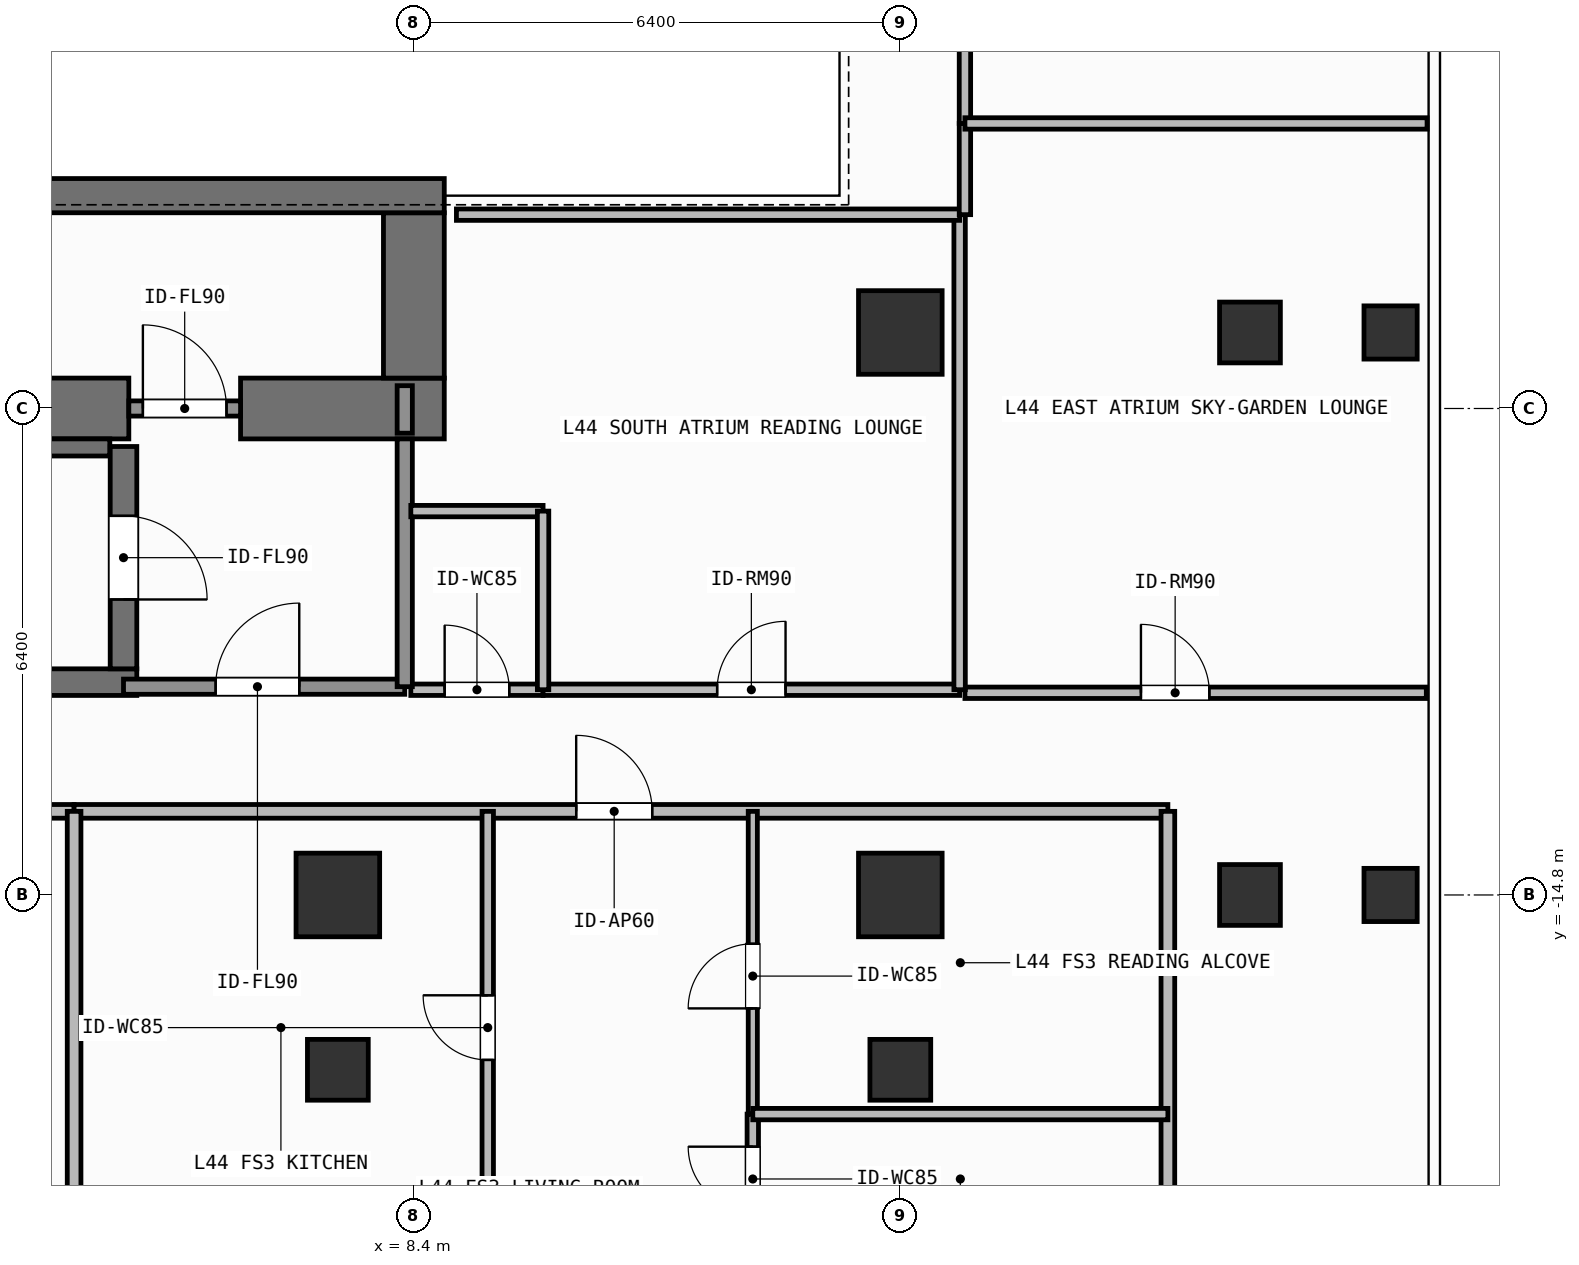
"""IFC4 building model, lengths in metres.
Left out: names, types, materials, properties, quantities, classifications, styles, units other than length and angle.
Written with IfcOpenShell. Run it as: python <this file> out.ifc"""

import sys

from ifc_helpers import new_model, si_unit, direction, frame, frame_2d, origin, origin_2d, place, context, subcontext, project, spatial, rectangle, hollow_rectangle, extrude, element, fill, save


model = new_model("IFC4")
c1 = context("Model", 3, precision=1e-05, world=origin(), true_north=direction((0.0, 1.0)))
c2 = subcontext(c1, "Body", "Model", "MODEL_VIEW")
j1 = project(units=[si_unit("LENGTHUNIT", "METRE"), si_unit("PLANEANGLEUNIT", "RADIAN")], contexts=[c1])
p1 = place(None, origin())
s1 = spatial("IfcSite", under=j1, at=p1, CompositionType="ELEMENT")
p2 = place(p1, origin())
s2 = spatial("IfcBuilding", under=s1, at=p2, CompositionType="ELEMENT")
p3 = place(p2, frame((0.0, 0.0, 179.7)))
s3 = spatial("IfcBuildingStorey", under=s2, at=p3, CompositionType="ELEMENT", Elevation=179.7)
p4 = place(p3, frame((-2.62, -8.4, 0.0), z_axis=(0.0, 0.0, 1.0), x_axis=(1.0, 0.0, 0.0)))
e1 = element("IfcWall", 1, at=p4, inside=s3, PredefinedType="SHEAR", context=c2, shape_type="SweptSolid", body=[
    extrude(rectangle(XDim=7.27, YDim=0.8, at=frame_2d((3.635, 0.0))), origin(), (0.0, 0.0, 1.0), 3.9),
])
p5 = place(p3, frame((6.12, -8.4, 0.0), z_axis=(0.0, 0.0, 1.0), x_axis=(1.0, 0.0, 0.0)))
e2 = element("IfcWall", 2, at=p5, inside=s3, PredefinedType="SHEAR", context=c2, shape_type="SweptSolid", body=[
    extrude(rectangle(XDim=2.68, YDim=0.8, at=frame_2d((1.34, 0.0))), origin(), (0.0, 0.0, 1.0), 3.9),
])
p6 = place(p3, frame((8.4, -8.0, 0.0), z_axis=(0.0, 0.0, 1.0), x_axis=(0.0, 1.0, 0.0)))
e3 = element("IfcWall", 3, at=p6, inside=s3, PredefinedType="SHEAR", context=c2, shape_type="SweptSolid", body=[
    extrude(rectangle(XDim=2.175, YDim=0.8, at=frame_2d((1.087, 0.0))), origin(), (0.0, 0.0, 1.0), 3.9),
])
p7 = place(p3, frame((3.045, -5.6, 0.0), z_axis=(0.0, 0.0, 1.0), x_axis=(1.0, 0.0, 0.0)))
e4 = element("IfcWall", 4, at=p7, inside=s3, PredefinedType="SHEAR", context=c2, shape_type="SweptSolid", body=[
    extrude(rectangle(XDim=5.755, YDim=0.45, at=frame_2d((2.877, 0.0))), origin(), (0.0, 0.0, 1.0), 3.9),
])
p8 = place(p3, frame((-2.555, -12.0, 0.0), z_axis=(0.0, 0.0, 1.0), x_axis=(1.0, 0.0, 0.0)))
e5 = element("IfcWall", 5, at=p8, inside=s3, PredefinedType="SHEAR", context=c2, shape_type="SweptSolid", body=[
    extrude(rectangle(XDim=7.31, YDim=0.35, at=frame_2d((3.655, 0.0))), origin(), (0.0, 0.0, 1.0), 3.9),
])
p9 = place(p3, frame((-2.2, -8.913, 0.0), z_axis=(0.0, 0.0, 1.0), x_axis=(1.0, 0.0, 0.0)))
e6 = element("IfcWall", 6, at=p9, inside=s3, PredefinedType="SHEAR", context=c2, shape_type="SweptSolid", body=[
    extrude(rectangle(XDim=6.6, YDim=0.225, at=frame_2d((3.3, 0.0))), origin(), (0.0, 0.0, 1.0), 3.9),
])
p10 = place(p3, frame((4.58, -8.9, 0.0), z_axis=(0.0, 0.0, 1.0), x_axis=(0.0, -1.0, 0.0)))
e7 = element("IfcWall", 7, at=p10, inside=s3, PredefinedType="SHEAR", context=c2, shape_type="SweptSolid", body=[
    extrude(rectangle(XDim=2.925, YDim=0.35, at=frame_2d((1.462, 0.0))), origin(), (0.0, 0.0, 1.0), 3.9),
])
p11 = place(p10, frame((0.913, 0.0, 0.0)))
e8 = element("IfcOpeningElement", 8, at=p11, cuts=e7, PredefinedType="OPENING", context=c2, shape_type="SweptSolid", body=[
    extrude(rectangle(XDim=1.1, YDim=2.15, at=frame_2d((0.55, 1.075))), frame((0.0, 0.185, 0.0), z_axis=(0.0, -1.0, 0.0), x_axis=(1.0, 0.0, 0.0)), (0.0, 0.0, 1.0), 0.37),
])
for number, where, z_axis, x_axis in (
    (9, (7.4, -14.8, 0.0), (0.0, 0.0, 1.0), (1.0, 0.0, 0.0)),
    (10, (14.8, -14.8, 0.0), (0.0, 0.0, 1.0), (1.0, 0.0, 0.0)),
    (11, (14.8, -7.4, 0.0), (0.0, 0.0, 1.0), (1.0, 0.0, 0.0)),
):
    element("IfcColumn", number, at=place(p3, frame(where, z_axis=z_axis, x_axis=x_axis)), inside=s3, PredefinedType="COLUMN", context=c2, shape_type="SweptSolid", body=[
        extrude(rectangle(XDim=1.1, YDim=1.1, at=origin_2d()), origin(), (0.0, 0.0, 1.0), 3.9),
    ])
for number, where, z_axis, x_axis in (
    (12, (19.4, -14.8, 0.0), (0.0, 0.0, 1.0), (1.0, 0.0, 0.0)),
    (13, (19.4, -7.4, 0.0), (0.0, 0.0, 1.0), (1.0, 0.0, 0.0)),
    (14, (7.4, -17.1, 0.0), (0.0, 0.0, 1.0), (1.0, 0.0, 0.0)),
    (15, (14.8, -17.1, 0.0), (0.0, 0.0, 1.0), (1.0, 0.0, 0.0)),
):
    element("IfcColumn", number, at=place(p3, frame(where, z_axis=z_axis, x_axis=x_axis)), inside=s3, PredefinedType="COLUMN", context=c2, shape_type="SweptSolid", body=[
        extrude(hollow_rectangle(XDim=0.8, YDim=0.8, WallThickness=0.036, at=origin_2d()), origin(), (0.0, 0.0, 1.0), 3.9),
    ])
for number, where, z_axis, x_axis in (
    (16, (21.25, -14.8, 0.0), (0.0, 0.0, 1.0), (1.0, 0.0, 0.0)),
    (17, (21.25, -7.4, 0.0), (0.0, 0.0, 1.0), (1.0, 0.0, 0.0)),
):
    element("IfcColumn", number, at=place(p3, frame(where, z_axis=z_axis, x_axis=x_axis)), inside=s3, PredefinedType="COLUMN", context=c2, shape_type="SweptSolid", body=[
        extrude(hollow_rectangle(XDim=0.7, YDim=0.7, WallThickness=0.032, at=origin_2d()), origin(), (0.0, 0.0, 1.0), 3.9),
    ])
p12 = place(p3, frame((4.58, -12.06, 0.0), z_axis=(0.0, 0.0, 1.0), x_axis=(1.0, 0.0, 0.0)))
e18 = element("IfcWall", 18, at=p12, inside=s3, PredefinedType="SOLIDWALL", context=c2, shape_type="SweptSolid", body=[
    extrude(rectangle(XDim=3.7, YDim=0.2, at=frame_2d((1.85, 0.0))), origin(), (0.0, 0.0, 1.0), 3.68),
])
p13 = place(p12, frame((1.212, 0.0, 0.0)))
e19 = element("IfcOpeningElement", 19, at=p13, cuts=e18, PredefinedType="OPENING", context=c2, shape_type="SweptSolid", body=[
    extrude(rectangle(XDim=1.1, YDim=2.15, at=frame_2d((0.55, 1.075))), frame((0.0, 0.11, 0.0), z_axis=(0.0, -1.0, 0.0), x_axis=(1.0, 0.0, 0.0)), (0.0, 0.0, 1.0), 0.22),
])
p14 = place(p3, frame((4.65, -8.4, 0.0), z_axis=(0.0, 0.0, 1.0), x_axis=(1.0, 0.0, 0.0)))
e20 = element("IfcWall", 20, at=p14, inside=s3, PredefinedType="SOLIDWALL", context=c2, shape_type="SweptSolid", body=[
    extrude(rectangle(XDim=1.47, YDim=0.2, at=frame_2d((0.735, 0.0))), origin(), (0.0, 0.0, 1.0), 2.82),
])
p15 = place(p14, frame((0.185, 0.0, 0.0)))
e21 = element("IfcOpeningElement", 21, at=p15, cuts=e20, PredefinedType="OPENING", context=c2, shape_type="SweptSolid", body=[
    extrude(rectangle(XDim=1.1, YDim=2.15, at=frame_2d((0.55, 1.075))), frame((0.0, 0.11, 0.0), z_axis=(0.0, -1.0, 0.0), x_axis=(1.0, 0.0, 0.0)), (0.0, 0.0, 1.0), 0.22),
])
p16 = place(p3, frame((8.36, -12.1, 0.0), z_axis=(0.0, 0.0, 1.0), x_axis=(1.0, 0.0, 0.0)))
e22 = element("IfcWall", 22, at=p16, inside=s3, PredefinedType="PARTITIONING", context=c2, shape_type="SweptSolid", body=[
    extrude(rectangle(XDim=1.74, YDim=0.15, at=frame_2d((0.87, 0.0))), origin(), (0.0, 0.0, 1.0), 3.68),
])
p17 = place(p16, frame((0.445, 0.0, 0.0)))
e23 = element("IfcOpeningElement", 23, at=p17, cuts=e22, PredefinedType="OPENING", context=c2, shape_type="SweptSolid", body=[
    extrude(rectangle(XDim=0.85, YDim=2.1, at=frame_2d((0.425, 1.05))), frame((0.0, 0.085, 0.0), z_axis=(0.0, -1.0, 0.0), x_axis=(1.0, 0.0, 0.0)), (0.0, 0.0, 1.0), 0.17),
])
p18 = place(p3, frame((10.1, -12.1, 0.0), z_axis=(0.0, 0.0, 1.0), x_axis=(1.0, 0.0, 0.0)))
e24 = element("IfcWall", 24, at=p18, inside=s3, PredefinedType="PARTITIONING", context=c2, shape_type="SweptSolid", body=[
    extrude(rectangle(XDim=5.48, YDim=0.15, at=frame_2d((2.74, 0.0))), origin(), (0.0, 0.0, 1.0), 3.68),
])
p19 = place(p18, frame((2.29, 0.0, 0.0)))
e25 = element("IfcOpeningElement", 25, at=p19, cuts=e24, PredefinedType="OPENING", context=c2, shape_type="SweptSolid", body=[
    extrude(rectangle(XDim=0.9, YDim=2.1, at=frame_2d((0.45, 1.05))), frame((0.0, 0.085, 0.0), z_axis=(0.0, -1.0, 0.0), x_axis=(1.0, 0.0, 0.0)), (0.0, 0.0, 1.0), 0.17),
])
p20 = place(p3, frame((-6.618, -13.7, 0.0), z_axis=(0.0, 0.0, 1.0), x_axis=(1.0, 0.0, 0.0)))
e26 = element("IfcWall", 26, at=p20, inside=s3, PredefinedType="PARTITIONING", context=c2, shape_type="SweptSolid", body=[
    extrude(rectangle(XDim=10.548, YDim=0.18, at=frame_2d((5.274, 0.0))), origin(), (0.0, 0.0, 1.0), 3.68),
])
p21 = place(p20, frame((4.951, 0.0, 0.0)))
e27 = element("IfcOpeningElement", 27, at=p21, cuts=e26, PredefinedType="OPENING", context=c2, shape_type="SweptSolid", body=[
    extrude(rectangle(XDim=1.0, YDim=2.2, at=frame_2d((0.5, 1.1))), frame((0.0, 0.1, 0.0), z_axis=(0.0, -1.0, 0.0), x_axis=(1.0, 0.0, 0.0)), (0.0, 0.0, 1.0), 0.2),
])
p22 = place(p3, frame((3.93, -13.7, 0.0), z_axis=(0.0, 0.0, 1.0), x_axis=(1.0, 0.0, 0.0)))
e28 = element("IfcWall", 28, at=p22, inside=s3, PredefinedType="PARTITIONING", context=c2, shape_type="SweptSolid", body=[
    extrude(rectangle(XDim=14.39, YDim=0.18, at=frame_2d((7.195, 0.0))), origin(), (0.0, 0.0, 1.0), 3.68),
])
p23 = place(p22, frame((6.605, 0.0, 0.0)))
e29 = element("IfcOpeningElement", 29, at=p23, cuts=e28, PredefinedType="OPENING", context=c2, shape_type="SweptSolid", body=[
    extrude(rectangle(XDim=1.0, YDim=2.2, at=frame_2d((0.5, 1.1))), frame((0.0, 0.1, 0.0), z_axis=(0.0, -1.0, 0.0), x_axis=(1.0, 0.0, 0.0)), (0.0, 0.0, 1.0), 0.2),
])
p24 = place(p3, frame((9.372, -19.39, 0.0), z_axis=(0.0, 0.0, 1.0), x_axis=(0.0, 1.0, 0.0)))
e30 = element("IfcWall", 30, at=p24, inside=s3, PredefinedType="PARTITIONING", context=c2, shape_type="SweptSolid", body=[
    extrude(rectangle(XDim=5.69, YDim=0.15, at=frame_2d((2.845, 0.0))), origin(), (0.0, 0.0, 1.0), 3.68),
])
p25 = place(p24, frame((2.42, 0.0, 0.0)))
e31 = element("IfcOpeningElement", 31, at=p25, cuts=e30, PredefinedType="OPENING", context=c2, shape_type="SweptSolid", body=[
    extrude(rectangle(XDim=0.85, YDim=2.1, at=frame_2d((0.425, 1.05))), frame((0.0, 0.085, 0.0), z_axis=(0.0, -1.0, 0.0), x_axis=(1.0, 0.0, 0.0)), (0.0, 0.0, 1.0), 0.17),
])
p26 = place(p3, frame((12.859, -19.39, 0.0), z_axis=(0.0, 0.0, 1.0), x_axis=(0.0, 1.0, 0.0)))
e32 = element("IfcWall", 32, at=p26, inside=s3, PredefinedType="PARTITIONING", context=c2, shape_type="SweptSolid", body=[
    extrude(rectangle(XDim=1.707, YDim=0.15, at=frame_2d((0.854, 0.0))), origin(), (0.0, 0.0, 1.0), 3.68),
])
p27 = place(p26, frame((0.428, 0.0, 0.0)))
e33 = element("IfcOpeningElement", 33, at=p27, cuts=e32, PredefinedType="OPENING", context=c2, shape_type="SweptSolid", body=[
    extrude(rectangle(XDim=0.85, YDim=2.1, at=frame_2d((0.425, 1.05))), frame((0.0, 0.085, 0.0), z_axis=(0.0, -1.0, 0.0), x_axis=(1.0, 0.0, 0.0)), (0.0, 0.0, 1.0), 0.17),
])
p28 = place(p3, frame((12.859, -17.683, 0.0), z_axis=(0.0, 0.0, 1.0), x_axis=(0.0, 1.0, 0.0)))
e34 = element("IfcWall", 34, at=p28, inside=s3, PredefinedType="PARTITIONING", context=c2, shape_type="SweptSolid", body=[
    extrude(rectangle(XDim=3.983, YDim=0.12, at=frame_2d((1.992, 0.0))), origin(), (0.0, 0.0, 1.0), 3.68),
])
p29 = place(p28, frame((1.391, 0.0, 0.0)))
e35 = element("IfcOpeningElement", 35, at=p29, cuts=e34, PredefinedType="OPENING", context=c2, shape_type="SweptSolid", body=[
    extrude(rectangle(XDim=0.85, YDim=2.1, at=frame_2d((0.425, 1.05))), frame((0.0, 0.07, 0.0), z_axis=(0.0, -1.0, 0.0), x_axis=(1.0, 0.0, 0.0)), (0.0, 0.0, 1.0), 0.14),
])
p30 = place(p3, frame((15.65, -12.14, 0.0), z_axis=(0.0, 0.0, 1.0), x_axis=(1.0, 0.0, 0.0)))
e36 = element("IfcWall", 36, at=p30, inside=s3, PredefinedType="PARTITIONING", context=c2, shape_type="SweptSolid", body=[
    extrude(rectangle(XDim=6.07, YDim=0.15, at=frame_2d((3.035, 0.0))), origin(), (0.0, 0.0, 1.0), 3.68),
])
p31 = place(p30, frame((2.316, 0.0, 0.0)))
e37 = element("IfcOpeningElement", 37, at=p31, cuts=e36, PredefinedType="OPENING", context=c2, shape_type="SweptSolid", body=[
    extrude(rectangle(XDim=0.9, YDim=2.1, at=frame_2d((0.45, 1.05))), frame((0.0, 0.085, 0.0), z_axis=(0.0, -1.0, 0.0), x_axis=(1.0, 0.0, 0.0)), (0.0, 0.0, 1.0), 0.17),
])
p32 = place(p3, frame((8.28, -12.06, 0.0), z_axis=(0.0, 0.0, 1.0), x_axis=(0.0, 1.0, 0.0)))
e38 = element("IfcWall", 38, at=p32, inside=s3, PredefinedType="SOLIDWALL", context=c2, shape_type="SweptSolid", body=[
    extrude(rectangle(XDim=3.26, YDim=0.2, at=frame_2d((1.63, 0.0))), origin(), (0.0, 0.0, 1.0), 3.68),
])
p33 = place(p3, frame((8.28, -8.725, 0.0), z_axis=(0.0, 0.0, 1.0), x_axis=(0.0, 1.0, 0.0)))
e39 = element("IfcWall", 39, at=p33, inside=s3, PredefinedType="SOLIDWALL", context=c2, shape_type="SweptSolid", body=[
    extrude(rectangle(XDim=0.625, YDim=0.2, at=frame_2d((0.312, 0.0))), origin(), (0.0, 0.0, 1.0), 3.68),
])
p34 = place(p3, frame((8.36, -9.75, 0.0), z_axis=(0.0, 0.0, 1.0), x_axis=(1.0, 0.0, 0.0)))
e40 = element("IfcWall", 40, at=p34, inside=s3, PredefinedType="PARTITIONING", context=c2, shape_type="SweptSolid", body=[
    extrude(rectangle(XDim=1.74, YDim=0.15, at=frame_2d((0.87, 0.0))), origin(), (0.0, 0.0, 1.0), 3.68),
])
p35 = place(p3, frame((10.1, -12.1, 0.0), z_axis=(0.0, 0.0, 1.0), x_axis=(0.0, 1.0, 0.0)))
e41 = element("IfcWall", 41, at=p35, inside=s3, PredefinedType="PARTITIONING", context=c2, shape_type="SweptSolid", body=[
    extrude(rectangle(XDim=2.35, YDim=0.15, at=frame_2d((1.175, 0.0))), origin(), (0.0, 0.0, 1.0), 3.68),
])
p36 = place(p3, frame((15.58, -12.1, 0.0), z_axis=(0.0, 0.0, 1.0), x_axis=(0.0, 1.0, 0.0)))
e42 = element("IfcWall", 42, at=p36, inside=s3, PredefinedType="PARTITIONING", context=c2, shape_type="SweptSolid", body=[
    extrude(rectangle(XDim=6.25, YDim=0.15, at=frame_2d((3.125, 0.0))), origin(), (0.0, 0.0, 1.0), 3.68),
])
p37 = place(p3, frame((8.96, -5.85, 0.0), z_axis=(0.0, 0.0, 1.0), x_axis=(1.0, 0.0, 0.0)))
e43 = element("IfcWall", 43, at=p37, inside=s3, PredefinedType="PARTITIONING", context=c2, shape_type="SweptSolid", body=[
    extrude(rectangle(XDim=6.62, YDim=0.15, at=frame_2d((3.31, 0.0))), origin(), (0.0, 0.0, 1.0), 3.68),
])
p38 = place(p3, frame((18.32, -22.51, 0.0), z_axis=(0.0, 0.0, 1.0), x_axis=(0.0, 1.0, 0.0)))
e44 = element("IfcWall", 44, at=p38, inside=s3, PredefinedType="PARTITIONING", context=c2, shape_type="SweptSolid", body=[
    extrude(rectangle(XDim=8.81, YDim=0.18, at=frame_2d((4.405, 0.0))), origin(), (0.0, 0.0, 1.0), 3.68),
])
p39 = place(p3, frame((12.859, -17.683, 0.0), z_axis=(0.0, 0.0, 1.0), x_axis=(1.0, 0.0, 0.0)))
e45 = element("IfcWall", 45, at=p39, inside=s3, PredefinedType="PARTITIONING", context=c2, shape_type="SweptSolid", body=[
    extrude(rectangle(XDim=5.461, YDim=0.15, at=frame_2d((2.73, 0.0))), origin(), (0.0, 0.0, 1.0), 3.68),
])
p40 = place(p3, frame((3.93, -23.63, 0.0), z_axis=(0.0, 0.0, 1.0), x_axis=(0.0, 1.0, 0.0)))
e46 = element("IfcWall", 46, at=p40, inside=s3, PredefinedType="PARTITIONING", context=c2, shape_type="SweptSolid", body=[
    extrude(rectangle(XDim=9.93, YDim=0.18, at=frame_2d((4.965, 0.0))), origin(), (0.0, 0.0, 1.0), 3.68),
])
p41 = place(p3, frame((15.65, -5.85, 0.0), z_axis=(0.0, 0.0, 1.0), x_axis=(0.0, 1.0, 0.0)))
e47 = element("IfcWall", 47, at=p41, inside=s3, PredefinedType="PARTITIONING", context=c2, shape_type="SweptSolid", body=[
    extrude(rectangle(XDim=1.2, YDim=0.15, at=frame_2d((0.6, 0.0))), origin(), (0.0, 0.0, 1.0), 3.68),
])
p42 = place(p3, frame((15.65, -4.65, 0.0), z_axis=(0.0, 0.0, 1.0), x_axis=(0.0, 1.0, 0.0)))
e48 = element("IfcWall", 48, at=p42, inside=s3, PredefinedType="PARTITIONING", context=c2, shape_type="SweptSolid", body=[
    extrude(rectangle(XDim=10.5, YDim=0.15, at=frame_2d((5.25, 0.0))), origin(), (0.0, 0.0, 1.0), 3.68),
])
p43 = place(p3, frame((15.65, -4.65, 0.0), z_axis=(0.0, 0.0, 1.0), x_axis=(1.0, 0.0, 0.0)))
e49 = element("IfcWall", 49, at=p43, inside=s3, PredefinedType="PARTITIONING", context=c2, shape_type="SweptSolid", body=[
    extrude(rectangle(XDim=6.08, YDim=0.15, at=frame_2d((3.04, 0.0))), origin(), (0.0, 0.0, 1.0), 3.68),
])
p44 = place(p11, origin())
e50 = element("IfcDoor", 50, at=p44, inside=s3, OperationType="SINGLE_SWING_RIGHT", PredefinedType="DOOR", context=c2, shape_type="SweptSolid", body=[
    extrude(rectangle(XDim=1.1, YDim=2.15, at=frame_2d((0.55, 1.075))), frame((0.0, 0.025, 0.0), z_axis=(0.0, -1.0, 0.0), x_axis=(1.0, 0.0, 0.0)), (0.0, 0.0, 1.0), 0.05),
])
fill(e8, e50)
p45 = place(p13, origin())
e51 = element("IfcDoor", 51, at=p45, inside=s3, OperationType="SINGLE_SWING_RIGHT", PredefinedType="DOOR", context=c2, shape_type="SweptSolid", body=[
    extrude(rectangle(XDim=1.1, YDim=2.15, at=frame_2d((0.55, 1.075))), frame((0.0, 0.025, 0.0), z_axis=(0.0, -1.0, 0.0), x_axis=(1.0, 0.0, 0.0)), (0.0, 0.0, 1.0), 0.05),
])
fill(e19, e51)
p46 = place(p15, origin())
e52 = element("IfcDoor", 52, at=p46, inside=s3, OperationType="SINGLE_SWING_LEFT", PredefinedType="DOOR", context=c2, shape_type="SweptSolid", body=[
    extrude(rectangle(XDim=1.1, YDim=2.15, at=frame_2d((0.55, 1.075))), frame((0.0, 0.025, 0.0), z_axis=(0.0, -1.0, 0.0), x_axis=(1.0, 0.0, 0.0)), (0.0, 0.0, 1.0), 0.05),
])
fill(e21, e52)
p47 = place(p17, origin())
e53 = element("IfcDoor", 53, at=p47, inside=s3, OperationType="SINGLE_SWING_LEFT", PredefinedType="DOOR", context=c2, shape_type="SweptSolid", body=[
    extrude(rectangle(XDim=0.85, YDim=2.1, at=frame_2d((0.425, 1.05))), frame((0.0, 0.025, 0.0), z_axis=(0.0, -1.0, 0.0), x_axis=(1.0, 0.0, 0.0)), (0.0, 0.0, 1.0), 0.05),
])
fill(e23, e53)
p48 = place(p19, origin())
e54 = element("IfcDoor", 54, at=p48, inside=s3, OperationType="SINGLE_SWING_RIGHT", PredefinedType="DOOR", context=c2, shape_type="SweptSolid", body=[
    extrude(rectangle(XDim=0.9, YDim=2.1, at=frame_2d((0.45, 1.05))), frame((0.0, 0.025, 0.0), z_axis=(0.0, -1.0, 0.0), x_axis=(1.0, 0.0, 0.0)), (0.0, 0.0, 1.0), 0.05),
])
fill(e25, e54)
p49 = place(p23, origin())
e55 = element("IfcDoor", 55, at=p49, inside=s3, OperationType="SINGLE_SWING_LEFT", PredefinedType="DOOR", context=c2, shape_type="SweptSolid", body=[
    extrude(rectangle(XDim=1.0, YDim=2.2, at=frame_2d((0.5, 1.1))), frame((0.0, 0.025, 0.0), z_axis=(0.0, -1.0, 0.0), x_axis=(1.0, 0.0, 0.0)), (0.0, 0.0, 1.0), 0.05),
])
fill(e29, e55)
p50 = place(p25, origin())
e56 = element("IfcDoor", 56, at=p50, inside=s3, OperationType="SINGLE_SWING_RIGHT", PredefinedType="DOOR", context=c2, shape_type="SweptSolid", body=[
    extrude(rectangle(XDim=0.85, YDim=2.1, at=frame_2d((0.425, 1.05))), frame((0.0, 0.025, 0.0), z_axis=(0.0, -1.0, 0.0), x_axis=(1.0, 0.0, 0.0)), (0.0, 0.0, 1.0), 0.05),
])
fill(e31, e56)
p51 = place(p27, origin())
e57 = element("IfcDoor", 57, at=p51, inside=s3, OperationType="SINGLE_SWING_RIGHT", PredefinedType="DOOR", context=c2, shape_type="SweptSolid", body=[
    extrude(rectangle(XDim=0.85, YDim=2.1, at=frame_2d((0.425, 1.05))), frame((0.0, 0.025, 0.0), z_axis=(0.0, -1.0, 0.0), x_axis=(1.0, 0.0, 0.0)), (0.0, 0.0, 1.0), 0.05),
])
fill(e33, e57)
p52 = place(p29, origin())
e58 = element("IfcDoor", 58, at=p52, inside=s3, OperationType="SINGLE_SWING_LEFT", PredefinedType="DOOR", context=c2, shape_type="SweptSolid", body=[
    extrude(rectangle(XDim=0.85, YDim=2.1, at=frame_2d((0.425, 1.05))), frame((0.0, 0.025, 0.0), z_axis=(0.0, -1.0, 0.0), x_axis=(1.0, 0.0, 0.0)), (0.0, 0.0, 1.0), 0.05),
])
fill(e35, e58)
p53 = place(p31, origin())
e59 = element("IfcDoor", 59, at=p53, inside=s3, OperationType="SINGLE_SWING_LEFT", PredefinedType="DOOR", context=c2, shape_type="SweptSolid", body=[
    extrude(rectangle(XDim=0.9, YDim=2.1, at=frame_2d((0.45, 1.05))), frame((0.0, 0.025, 0.0), z_axis=(0.0, -1.0, 0.0), x_axis=(1.0, 0.0, 0.0)), (0.0, 0.0, 1.0), 0.05),
])
fill(e37, e59)
save(model, sys.argv[1])
